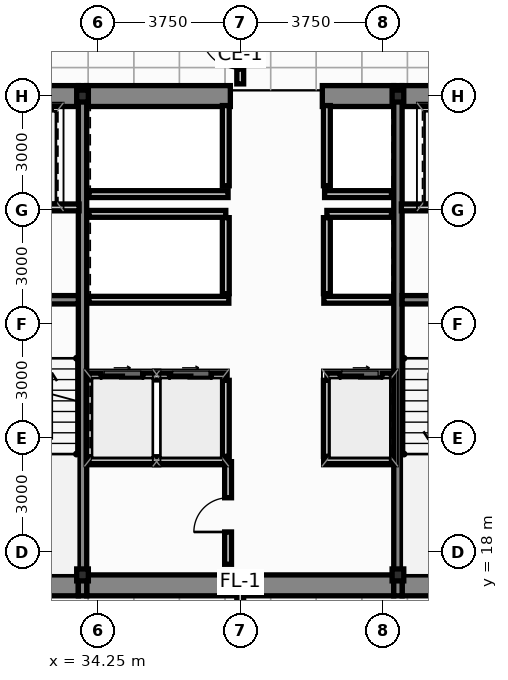
"""IFC4 building model, lengths in metres.
Left out: names, types, materials, properties, quantities, classifications, styles, units other than length and angle.
Written with IfcOpenShell. Run it as: python <this file> out.ifc"""

import sys

from ifc_helpers import new_model, si_unit, direction, frame, frame_2d, origin, origin_2d, place, context, subcontext, project, spatial, rectangle, i_section, extrude, source, transform, mapped, element, fill, save


model = new_model("IFC4")
c1 = context("Model", 3, precision=1e-05, world=origin(), true_north=direction((0.0, 1.0)))
c2 = subcontext(c1, "Body", "Model", "MODEL_VIEW")
j1 = project(units=[si_unit("LENGTHUNIT", "METRE"), si_unit("PLANEANGLEUNIT", "RADIAN")], contexts=[c1])
p1 = place(None, origin())
s1 = spatial("IfcSite", under=j1, at=p1, CompositionType="ELEMENT")
p2 = place(p1, origin())
s2 = spatial("IfcBuilding", under=s1, at=p2, CompositionType="ELEMENT")
p3 = place(p2, frame((0.0, 0.0, 49.5)))
s3 = spatial("IfcBuildingStorey", under=s2, at=p3, CompositionType="ELEMENT", Elevation=49.5)
m1 = source(origin(), c2, "Body", "SweptSolid", [
    extrude(i_section(OverallWidth=0.307, OverallDepth=0.315, WebThickness=0.012, FlangeThickness=0.019, at=origin_2d()), origin(), (0.0, 0.0, 1.0), 3.65),
])
for number, where, z_axis, x_axis in (
    (1, (33.85, 17.4, 0.0), (0.0, 0.0, 1.0), (1.0, 0.0, 0.0)),
    (2, (42.15, 17.4, 0.0), (0.0, 0.0, 1.0), (1.0, 0.0, 0.0)),
    (3, (33.85, 30.0, 0.0), (0.0, 0.0, 1.0), (1.0, 0.0, 0.0)),
    (4, (42.15, 30.0, 0.0), (0.0, 0.0, 1.0), (1.0, 0.0, 0.0)),
):
    element("IfcColumn", number, at=place(p3, frame(where, z_axis=z_axis, x_axis=x_axis)), inside=s3, PredefinedType="COLUMN", context=c2, shape_type="MappedRepresentation", body=[
        mapped(m1, transform((0.0, 0.0, 0.0), scale=1.0)),
    ])
p4 = place(p3, frame((30.84, 17.125, 0.0), z_axis=(0.0, 0.0, 1.0), x_axis=(1.0, 0.0, 0.0)))
e5 = element("IfcWall", 5, at=p4, inside=s3, PredefinedType="SHEAR", context=c2, shape_type="SweptSolid", body=[
    extrude(rectangle(XDim=2.9, YDim=0.55, at=frame_2d((1.45, 0.0))), origin(), (0.0, 0.0, 1.0), 3.65),
])
p5 = place(p3, frame((33.96, 17.125, 0.0), z_axis=(0.0, 0.0, 1.0), x_axis=(1.0, 0.0, 0.0)))
e6 = element("IfcWall", 6, at=p5, inside=s3, PredefinedType="SHEAR", context=c2, shape_type="SweptSolid", body=[
    extrude(rectangle(XDim=8.08, YDim=0.55, at=frame_2d((4.04, 0.0))), origin(), (0.0, 0.0, 1.0), 3.65),
])
for number, where, z_axis, x_axis in (
    (7, (42.26, 17.125, 0.0), (0.0, 0.0, 1.0), (1.0, 0.0, 0.0)),
    (8, (30.84, 30.0, 0.0), (0.0, 0.0, 1.0), (1.0, 0.0, 0.0)),
):
    element("IfcWall", number, at=place(p3, frame(where, z_axis=z_axis, x_axis=x_axis)), inside=s3, PredefinedType="SHEAR", context=c2, shape_type="SweptSolid", body=[
        extrude(rectangle(XDim=2.9, YDim=0.55, at=frame_2d((1.45, 0.0))), origin(), (0.0, 0.0, 1.0), 3.65),
    ])
p6 = place(p3, frame((33.96, 30.0, 0.0), z_axis=(0.0, 0.0, 1.0), x_axis=(1.0, 0.0, 0.0)))
e9 = element("IfcWall", 9, at=p6, inside=s3, PredefinedType="SHEAR", context=c2, shape_type="SweptSolid", body=[
    extrude(rectangle(XDim=3.78, YDim=0.55, at=frame_2d((1.89, 0.0))), origin(), (0.0, 0.0, 1.0), 3.65),
])
p7 = place(p3, frame((40.16, 30.0, 0.0), z_axis=(0.0, 0.0, 1.0), x_axis=(1.0, 0.0, 0.0)))
e10 = element("IfcWall", 10, at=p7, inside=s3, PredefinedType="SHEAR", context=c2, shape_type="SweptSolid", body=[
    extrude(rectangle(XDim=1.88, YDim=0.55, at=frame_2d((0.94, 0.0))), origin(), (0.0, 0.0, 1.0), 3.65),
])
p8 = place(p3, frame((42.26, 30.0, 0.0), z_axis=(0.0, 0.0, 1.0), x_axis=(1.0, 0.0, 0.0)))
e11 = element("IfcWall", 11, at=p8, inside=s3, PredefinedType="SHEAR", context=c2, shape_type="SweptSolid", body=[
    extrude(rectangle(XDim=2.9, YDim=0.55, at=frame_2d((1.45, 0.0))), origin(), (0.0, 0.0, 1.0), 3.65),
])
for number, where, z_axis, x_axis in (
    (12, (33.85, 16.85, 0.0), (0.0, 0.0, 1.0), (0.0, 1.0, 0.0)),
    (13, (42.15, 16.85, 0.0), (0.0, 0.0, 1.0), (0.0, 1.0, 0.0)),
):
    element("IfcWall", number, at=place(p3, frame(where, z_axis=z_axis, x_axis=x_axis)), inside=s3, PredefinedType="SHEAR", context=c2, shape_type="SweptSolid", body=[
        extrude(rectangle(XDim=13.425, YDim=0.22, at=frame_2d((6.712, 0.0))), origin(), (0.0, 0.0, 1.0), 3.65),
    ])
for number, where, z_axis, x_axis in (
    (14, (30.84, 24.64, 0.0), (0.0, 0.0, 1.0), (1.0, 0.0, 0.0)),
    (15, (42.26, 24.64, 0.0), (0.0, 0.0, 1.0), (1.0, 0.0, 0.0)),
):
    element("IfcWall", number, at=place(p3, frame(where, z_axis=z_axis, x_axis=x_axis)), inside=s3, PredefinedType="SHEAR", context=c2, shape_type="SweptSolid", body=[
        extrude(rectangle(XDim=2.9, YDim=0.22, at=frame_2d((1.45, 0.0))), origin(), (0.0, 0.0, 1.0), 3.65),
    ])
p9 = place(p3, frame((34.02, 22.62, 0.0), z_axis=(0.0, 0.0, 1.0), x_axis=(1.0, 0.0, 0.0)))
e16 = element("IfcWall", 16, at=p9, inside=s3, PredefinedType="PARTITIONING", context=c2, shape_type="SweptSolid", body=[
    extrude(rectangle(XDim=3.6, YDim=0.18, at=frame_2d((1.8, 0.0))), origin(), (0.0, 0.0, 1.0), 3.4),
])
p10 = place(p9, frame((0.32, 0.0, 0.0)))
e17 = element("IfcOpeningElement", 17, at=p10, cuts=e16, PredefinedType="OPENING", context=c2, shape_type="SweptSolid", body=[
    extrude(rectangle(XDim=1.1, YDim=2.2, at=frame_2d((0.55, 1.1))), frame((0.0, 0.102, 0.0), z_axis=(0.0, -1.0, 0.0), x_axis=(1.0, 0.0, 0.0)), (0.0, 0.0, 1.0), 0.204),
])
p11 = place(p9, frame((2.12, 0.0, 0.0)))
e18 = element("IfcOpeningElement", 18, at=p11, cuts=e16, PredefinedType="OPENING", context=c2, shape_type="SweptSolid", body=[
    extrude(rectangle(XDim=1.1, YDim=2.2, at=frame_2d((0.55, 1.1))), frame((0.0, 0.102, 0.0), z_axis=(0.0, -1.0, 0.0), x_axis=(1.0, 0.0, 0.0)), (0.0, 0.0, 1.0), 0.204),
])
p12 = place(p3, frame((40.28, 22.62, 0.0), z_axis=(0.0, 0.0, 1.0), x_axis=(1.0, 0.0, 0.0)))
e19 = element("IfcWall", 19, at=p12, inside=s3, PredefinedType="PARTITIONING", context=c2, shape_type="SweptSolid", body=[
    extrude(rectangle(XDim=1.7, YDim=0.18, at=frame_2d((0.85, 0.0))), origin(), (0.0, 0.0, 1.0), 3.4),
])
p13 = place(p12, frame((0.35, 0.0, 0.0)))
e20 = element("IfcOpeningElement", 20, at=p13, cuts=e19, PredefinedType="OPENING", context=c2, shape_type="SweptSolid", body=[
    extrude(rectangle(XDim=1.1, YDim=2.2, at=frame_2d((0.55, 1.1))), frame((0.0, 0.102, 0.0), z_axis=(0.0, -1.0, 0.0), x_axis=(1.0, 0.0, 0.0)), (0.0, 0.0, 1.0), 0.204),
])
for number, where, z_axis, x_axis in (
    (21, (37.62, 20.52, 0.0), (0.0, 0.0, 1.0), (0.0, 1.0, 0.0)),
    (22, (40.28, 20.52, 0.0), (0.0, 0.0, 1.0), (0.0, 1.0, 0.0)),
):
    element("IfcWall", number, at=place(p3, frame(where, z_axis=z_axis, x_axis=x_axis)), inside=s3, PredefinedType="PARTITIONING", context=c2, shape_type="SweptSolid", body=[
        extrude(rectangle(XDim=2.0, YDim=0.18, at=frame_2d((1.0, 0.0))), origin(), (0.0, 0.0, 1.0), 3.4),
    ])
p14 = place(p3, frame((34.02, 26.9, 0.0), z_axis=(0.0, 0.0, 1.0), x_axis=(1.0, 0.0, 0.0)))
e23 = element("IfcWall", 23, at=p14, inside=s3, PredefinedType="PARTITIONING", context=c2, shape_type="SweptSolid", body=[
    extrude(rectangle(XDim=3.6, YDim=0.18, at=frame_2d((1.8, 0.0))), origin(), (0.0, 0.0, 1.0), 3.4),
])
p15 = place(p3, frame((40.28, 26.9, 0.0), z_axis=(0.0, 0.0, 1.0), x_axis=(1.0, 0.0, 0.0)))
e24 = element("IfcWall", 24, at=p15, inside=s3, PredefinedType="PARTITIONING", context=c2, shape_type="SweptSolid", body=[
    extrude(rectangle(XDim=1.7, YDim=0.18, at=frame_2d((0.85, 0.0))), origin(), (0.0, 0.0, 1.0), 3.4),
])
for number, where, z_axis, x_axis in (
    (25, (37.62, 24.8, 0.0), (0.0, 0.0, 1.0), (0.0, 1.0, 0.0)),
    (26, (40.28, 24.8, 0.0), (0.0, 0.0, 1.0), (0.0, 1.0, 0.0)),
):
    element("IfcWall", number, at=place(p3, frame(where, z_axis=z_axis, x_axis=x_axis)), inside=s3, PredefinedType="PARTITIONING", context=c2, shape_type="SweptSolid", body=[
        extrude(rectangle(XDim=2.0, YDim=0.18, at=frame_2d((1.0, 0.0))), origin(), (0.0, 0.0, 1.0), 3.4),
    ])
p16 = place(p3, frame((34.02, 24.64, 0.0), z_axis=(0.0, 0.0, 1.0), x_axis=(1.0, 0.0, 0.0)))
e27 = element("IfcWall", 27, at=p16, inside=s3, PredefinedType="PARTITIONING", context=c2, shape_type="SweptSolid", body=[
    extrude(rectangle(XDim=3.68, YDim=0.18, at=frame_2d((1.84, 0.0))), origin(), (0.0, 0.0, 1.0), 3.4),
])
p17 = place(p3, frame((40.2, 24.64, 0.0), z_axis=(0.0, 0.0, 1.0), x_axis=(1.0, 0.0, 0.0)))
e28 = element("IfcWall", 28, at=p17, inside=s3, PredefinedType="PARTITIONING", context=c2, shape_type="SweptSolid", body=[
    extrude(rectangle(XDim=1.78, YDim=0.18, at=frame_2d((0.89, 0.0))), origin(), (0.0, 0.0, 1.0), 3.4),
])
p18 = place(p3, frame((34.02, 27.42, 0.0), z_axis=(0.0, 0.0, 1.0), x_axis=(1.0, 0.0, 0.0)))
e29 = element("IfcWall", 29, at=p18, inside=s3, PredefinedType="PARTITIONING", context=c2, shape_type="SweptSolid", body=[
    extrude(rectangle(XDim=3.66, YDim=0.18, at=frame_2d((1.83, 0.0))), origin(), (0.0, 0.0, 1.0), 3.4),
])
p19 = place(p3, frame((40.22, 27.42, 0.0), z_axis=(0.0, 0.0, 1.0), x_axis=(1.0, 0.0, 0.0)))
e30 = element("IfcWall", 30, at=p19, inside=s3, PredefinedType="PARTITIONING", context=c2, shape_type="SweptSolid", body=[
    extrude(rectangle(XDim=1.76, YDim=0.18, at=frame_2d((0.88, 0.0))), origin(), (0.0, 0.0, 1.0), 3.4),
])
for number, where, z_axis, x_axis in (
    (31, (37.62, 27.64, 0.0), (0.0, 0.0, 1.0), (0.0, 1.0, 0.0)),
    (32, (40.28, 27.64, 0.0), (0.0, 0.0, 1.0), (0.0, 1.0, 0.0)),
):
    element("IfcWall", number, at=place(p3, frame(where, z_axis=z_axis, x_axis=x_axis)), inside=s3, PredefinedType="PARTITIONING", context=c2, shape_type="SweptSolid", body=[
        extrude(rectangle(XDim=2.11, YDim=0.18, at=frame_2d((1.055, 0.0))), origin(), (0.0, 0.0, 1.0), 3.4),
    ])
for number, where, z_axis, x_axis in (
    (33, (30.86, 27.07, 0.0), (0.0, 0.0, 1.0), (1.0, 0.0, 0.0)),
    (34, (42.24, 27.07, 0.0), (0.0, 0.0, 1.0), (1.0, 0.0, 0.0)),
):
    element("IfcWall", number, at=place(p3, frame(where, z_axis=z_axis, x_axis=x_axis)), inside=s3, PredefinedType="PARTITIONING", context=c2, shape_type="SweptSolid", body=[
        extrude(rectangle(XDim=2.9, YDim=0.18, at=frame_2d((1.45, 0.0))), origin(), (0.0, 0.0, 1.0), 3.4),
    ])
p20 = place(p3, frame((34.02, 20.42, 0.0), z_axis=(0.0, 0.0, 1.0), x_axis=(1.0, 0.0, 0.0)))
e35 = element("IfcWall", 35, at=p20, inside=s3, PredefinedType="PARTITIONING", context=c2, shape_type="SweptSolid", body=[
    extrude(rectangle(XDim=3.64, YDim=0.18, at=frame_2d((1.82, 0.0))), origin(), (0.0, 0.0, 1.0), 3.4),
])
p21 = place(p3, frame((40.22, 20.42, 0.0), z_axis=(0.0, 0.0, 1.0), x_axis=(1.0, 0.0, 0.0)))
e36 = element("IfcWall", 36, at=p21, inside=s3, PredefinedType="PARTITIONING", context=c2, shape_type="SweptSolid", body=[
    extrude(rectangle(XDim=1.76, YDim=0.18, at=frame_2d((0.88, 0.0))), origin(), (0.0, 0.0, 1.0), 3.4),
])
p22 = place(p3, frame((37.68, 17.68, 0.0), z_axis=(0.0, 0.0, 1.0), x_axis=(0.0, 1.0, 0.0)))
e37 = element("IfcWall", 37, at=p22, inside=s3, PredefinedType="PARTITIONING", context=c2, shape_type="SweptSolid", body=[
    extrude(rectangle(XDim=2.7, YDim=0.18, at=frame_2d((1.35, 0.0))), origin(), (0.0, 0.0, 1.0), 3.4),
])
p23 = place(p22, frame((0.85, 0.0, 0.0)))
e38 = element("IfcOpeningElement", 38, at=p23, cuts=e37, PredefinedType="OPENING", context=c2, shape_type="SweptSolid", body=[
    extrude(rectangle(XDim=0.9, YDim=2.1, at=frame_2d((0.45, 1.05))), frame((0.0, 0.102, 0.0), z_axis=(0.0, -1.0, 0.0), x_axis=(1.0, 0.0, 0.0)), (0.0, 0.0, 1.0), 0.204),
])
p24 = place(p3, frame((38.0, 15.205, 0.0), z_axis=(0.0, 0.0, 1.0), x_axis=(0.0, 1.0, 0.0)))
e39 = element("IfcWall", 39, at=p24, inside=s3, PredefinedType="PARTITIONING", context=c2, shape_type="SweptSolid", body=[
    extrude(rectangle(XDim=1.82, YDim=0.18, at=frame_2d((0.91, 0.0))), origin(), (0.0, 0.0, 1.0), 3.4),
])
p25 = place(p24, frame((0.385, 0.0, 0.0)))
e40 = element("IfcOpeningElement", 40, at=p25, cuts=e39, PredefinedType="OPENING", context=c2, shape_type="SweptSolid", body=[
    extrude(rectangle(XDim=1.05, YDim=2.15, at=frame_2d((0.525, 1.075))), frame((0.0, 0.102, 0.0), z_axis=(0.0, -1.0, 0.0), x_axis=(1.0, 0.0, 0.0)), (0.0, 0.0, 1.0), 0.204),
])
p26 = place(p3, frame((38.0, 30.32, 0.0), z_axis=(0.0, 0.0, 1.0), x_axis=(0.0, 1.0, 0.0)))
e41 = element("IfcWall", 41, at=p26, inside=s3, PredefinedType="PARTITIONING", context=c2, shape_type="SweptSolid", body=[
    extrude(rectangle(XDim=1.825, YDim=0.18, at=frame_2d((0.913, 0.0))), origin(), (0.0, 0.0, 1.0), 3.4),
])
p27 = place(p26, frame((0.388, 0.0, 0.0)))
e42 = element("IfcOpeningElement", 42, at=p27, cuts=e41, PredefinedType="OPENING", context=c2, shape_type="SweptSolid", body=[
    extrude(rectangle(XDim=1.05, YDim=2.15, at=frame_2d((0.525, 1.075))), frame((0.0, 0.102, 0.0), z_axis=(0.0, -1.0, 0.0), x_axis=(1.0, 0.0, 0.0)), (0.0, 0.0, 1.0), 0.204),
])
p28 = place(p10, origin())
e43 = element("IfcDoor", 43, at=p28, inside=s3, OperationType="SLIDING_TO_LEFT", PredefinedType="DOOR", context=c2, shape_type="SweptSolid", body=[
    extrude(rectangle(XDim=1.1, YDim=2.2, at=frame_2d((0.55, 1.1))), frame((0.0, 0.025, 0.0), z_axis=(0.0, -1.0, 0.0), x_axis=(1.0, 0.0, 0.0)), (0.0, 0.0, 1.0), 0.05),
])
fill(e17, e43)
p29 = place(p11, origin())
e44 = element("IfcDoor", 44, at=p29, inside=s3, OperationType="SLIDING_TO_RIGHT", PredefinedType="DOOR", context=c2, shape_type="SweptSolid", body=[
    extrude(rectangle(XDim=1.1, YDim=2.2, at=frame_2d((0.55, 1.1))), frame((0.0, 0.025, 0.0), z_axis=(0.0, -1.0, 0.0), x_axis=(1.0, 0.0, 0.0)), (0.0, 0.0, 1.0), 0.05),
])
fill(e18, e44)
p30 = place(p13, origin())
e45 = element("IfcDoor", 45, at=p30, inside=s3, OperationType="SLIDING_TO_LEFT", PredefinedType="DOOR", context=c2, shape_type="SweptSolid", body=[
    extrude(rectangle(XDim=1.1, YDim=2.2, at=frame_2d((0.55, 1.1))), frame((0.0, 0.025, 0.0), z_axis=(0.0, -1.0, 0.0), x_axis=(1.0, 0.0, 0.0)), (0.0, 0.0, 1.0), 0.05),
])
fill(e20, e45)
p31 = place(p23, origin())
e46 = element("IfcDoor", 46, at=p31, inside=s3, OperationType="SINGLE_SWING_LEFT", PredefinedType="DOOR", context=c2, shape_type="SweptSolid", body=[
    extrude(rectangle(XDim=0.9, YDim=2.1, at=frame_2d((0.45, 1.05))), frame((0.0, 0.025, 0.0), z_axis=(0.0, -1.0, 0.0), x_axis=(1.0, 0.0, 0.0)), (0.0, 0.0, 1.0), 0.05),
])
fill(e38, e46)
p32 = place(p27, origin())
e47 = element("IfcDoor", 47, at=p32, inside=s3, OperationType="SINGLE_SWING_RIGHT", PredefinedType="DOOR", context=c2, shape_type="SweptSolid", body=[
    extrude(rectangle(XDim=1.05, YDim=2.15, at=frame_2d((0.525, 1.075))), frame((0.0, 0.025, 0.0), z_axis=(0.0, -1.0, 0.0), x_axis=(1.0, 0.0, 0.0)), (0.0, 0.0, 1.0), 0.05),
])
fill(e42, e47)
save(model, sys.argv[1])
